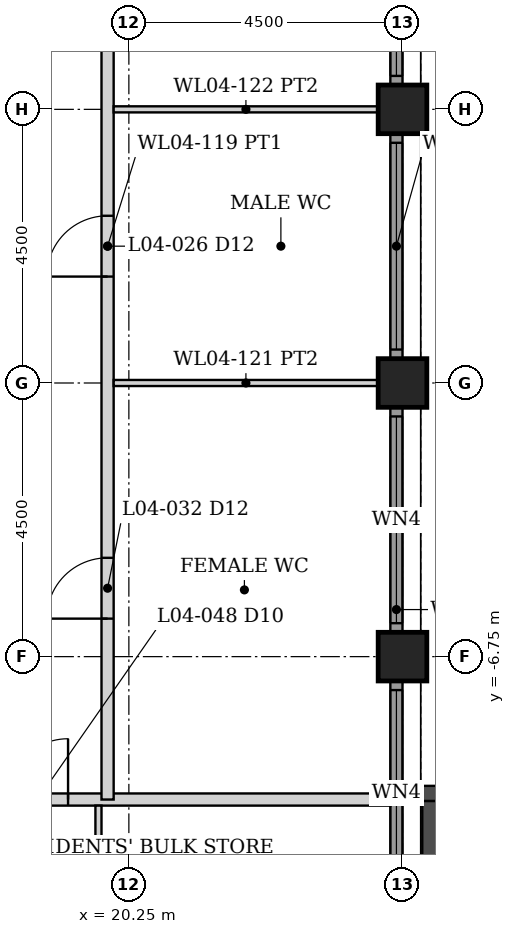
"""IFC4 building model, lengths in metres.
Left out: names, types, materials, properties, quantities, classifications, styles, units other than length and angle.
Written with IfcOpenShell. Run it as: python <this file> out.ifc"""

import sys

from ifc_helpers import new_model, si_unit, direction, frame, frame_2d, origin, origin_2d, place, context, subcontext, project, spatial, rectangle, hollow_rectangle, extrude, element, fill, save


model = new_model("IFC4")
c1 = context("Model", 3, precision=1e-05, world=origin(), true_north=direction((0.0, 1.0)))
c2 = subcontext(c1, "Body", "Model", "MODEL_VIEW")
j1 = project(units=[si_unit("LENGTHUNIT", "METRE"), si_unit("PLANEANGLEUNIT", "RADIAN")], contexts=[c1])
p1 = place(None, origin())
s1 = spatial("IfcSite", under=j1, at=p1, CompositionType="ELEMENT")
p2 = place(p1, origin())
s2 = spatial("IfcBuilding", under=s1, at=p2, CompositionType="ELEMENT")
p3 = place(p2, frame((0.0, 0.0, 21.5)))
s3 = spatial("IfcBuildingStorey", under=s2, at=p3, CompositionType="ELEMENT", Elevation=21.5)
for number, where, z_axis, x_axis in (
    (1, (24.75, -6.75, 0.0), (0.0, 0.0, 1.0), (1.0, 0.0, 0.0)),
    (2, (24.75, -2.25, 0.0), (0.0, 0.0, 1.0), (1.0, 0.0, 0.0)),
    (3, (24.75, 2.25, 0.0), (0.0, 0.0, 1.0), (1.0, 0.0, 0.0)),
):
    element("IfcColumn", number, at=place(p3, frame(where, z_axis=z_axis, x_axis=x_axis)), inside=s3, PredefinedType="COLUMN", context=c2, shape_type="SweptSolid", body=[
        extrude(hollow_rectangle(XDim=0.8, YDim=0.8, WallThickness=0.08, at=origin_2d()), origin(), (0.0, 0.0, 1.0), 5.0),
    ])
p4 = place(p3, frame((25.075, -9.0, 0.0), z_axis=(0.0, 0.0, 1.0), x_axis=(1.0, 0.0, 0.0)))
e4 = element("IfcWall", 4, at=p4, inside=s3, PredefinedType="SHEAR", context=c2, shape_type="SweptSolid", body=[
    extrude(rectangle(XDim=3.55, YDim=0.25, at=frame_2d((1.775, 0.0))), origin(), (0.0, 0.0, 1.0), 5.0),
])
p5 = place(p4, frame((0.475, 0.0, 0.0)))
e5 = element("IfcOpeningElement", 5, at=p5, cuts=e4, PredefinedType="OPENING", context=c2, shape_type="SweptSolid", body=[
    extrude(rectangle(XDim=1.2, YDim=2.2, at=frame_2d((0.6, 1.1))), frame((0.0, 0.135, 0.0), z_axis=(0.0, -1.0, 0.0), x_axis=(1.0, 0.0, 0.0)), (0.0, 0.0, 1.0), 0.27),
])
p6 = place(p3, frame((25.2, -16.375, 0.0), z_axis=(0.0, 0.0, 1.0), x_axis=(0.0, 1.0, 0.0)))
e6 = element("IfcWall", 6, at=p6, inside=s3, PredefinedType="SHEAR", context=c2, shape_type="SweptSolid", body=[
    extrude(rectangle(XDim=7.25, YDim=0.25, at=frame_2d((3.625, 0.0))), origin(), (0.0, 0.0, 1.0), 5.0),
])
p7 = place(p3, frame((24.65, -10.845, 0.0), z_axis=(0.0, 0.0, 1.0), x_axis=(0.0, 1.0, 0.0)))
e7 = element("IfcWall", 7, at=p7, inside=s3, PredefinedType="SOLIDWALL", context=c2, shape_type="SweptSolid", body=[
    extrude(rectangle(XDim=3.69, YDim=0.2, at=frame_2d((1.845, 0.0))), origin(), (0.0, 0.0, 1.0), 3.879),
])
p8 = place(p7, frame((0.145, 0.0, 0.3)))
e8 = element("IfcOpeningElement", 8, at=p8, cuts=e7, PredefinedType="OPENING", context=c2, shape_type="SweptSolid", body=[
    extrude(rectangle(XDim=3.4, YDim=3.429, at=frame_2d((1.7, 1.714))), frame((0.0, 0.11, 0.0), z_axis=(0.0, -1.0, 0.0), x_axis=(1.0, 0.0, 0.0)), (0.0, 0.0, 1.0), 0.22),
])
p9 = place(p3, frame((24.65, -6.345, 0.0), z_axis=(0.0, 0.0, 1.0), x_axis=(0.0, 1.0, 0.0)))
e9 = element("IfcWall", 9, at=p9, inside=s3, PredefinedType="SOLIDWALL", context=c2, shape_type="SweptSolid", body=[
    extrude(rectangle(XDim=3.69, YDim=0.2, at=frame_2d((1.845, 0.0))), origin(), (0.0, 0.0, 1.0), 3.879),
])
p10 = place(p9, frame((0.145, 0.0, 0.3)))
e10 = element("IfcOpeningElement", 10, at=p10, cuts=e9, PredefinedType="OPENING", context=c2, shape_type="SweptSolid", body=[
    extrude(rectangle(XDim=3.4, YDim=3.429, at=frame_2d((1.7, 1.714))), frame((0.0, 0.11, 0.0), z_axis=(0.0, -1.0, 0.0), x_axis=(1.0, 0.0, 0.0)), (0.0, 0.0, 1.0), 0.22),
])
p11 = place(p3, frame((24.65, -1.845, 0.0), z_axis=(0.0, 0.0, 1.0), x_axis=(0.0, 1.0, 0.0)))
e11 = element("IfcWall", 11, at=p11, inside=s3, PredefinedType="SOLIDWALL", context=c2, shape_type="SweptSolid", body=[
    extrude(rectangle(XDim=3.69, YDim=0.2, at=frame_2d((1.845, 0.0))), origin(), (0.0, 0.0, 1.0), 3.879),
])
p12 = place(p11, frame((0.145, 0.0, 0.3)))
e12 = element("IfcOpeningElement", 12, at=p12, cuts=e11, PredefinedType="OPENING", context=c2, shape_type="SweptSolid", body=[
    extrude(rectangle(XDim=3.4, YDim=3.429, at=frame_2d((1.7, 1.714))), frame((0.0, 0.11, 0.0), z_axis=(0.0, -1.0, 0.0), x_axis=(1.0, 0.0, 0.0)), (0.0, 0.0, 1.0), 0.22),
])
p13 = place(p3, frame((24.65, 2.655, 0.0), z_axis=(0.0, 0.0, 1.0), x_axis=(0.0, 1.0, 0.0)))
e13 = element("IfcWall", 13, at=p13, inside=s3, PredefinedType="SOLIDWALL", context=c2, shape_type="SweptSolid", body=[
    extrude(rectangle(XDim=3.69, YDim=0.2, at=frame_2d((1.845, 0.0))), origin(), (0.0, 0.0, 1.0), 3.879),
])
p14 = place(p13, frame((0.145, 0.0, 0.3)))
e14 = element("IfcOpeningElement", 14, at=p14, cuts=e13, PredefinedType="OPENING", context=c2, shape_type="SweptSolid", body=[
    extrude(rectangle(XDim=3.4, YDim=3.429, at=frame_2d((1.7, 1.714))), frame((0.0, 0.11, 0.0), z_axis=(0.0, -1.0, 0.0), x_axis=(1.0, 0.0, 0.0)), (0.0, 0.0, 1.0), 0.22),
])
p15 = place(p3, frame((-24.55, -9.1, 0.0), z_axis=(0.0, 0.0, 1.0), x_axis=(1.0, 0.0, 0.0)))
e15 = element("IfcWall", 15, at=p15, inside=s3, PredefinedType="PARTITIONING", context=c2, shape_type="SweptSolid", body=[
    extrude(rectangle(XDim=49.1, YDim=0.2, at=frame_2d((24.55, 0.0))), origin(), (0.0, 0.0, 1.0), 3.873),
])
p16 = place(p15, frame((6.452, 0.0, 0.0)))
e16 = element("IfcOpeningElement", 16, at=p16, cuts=e15, PredefinedType="OPENING", context=c2, shape_type="SweptSolid", body=[
    extrude(rectangle(XDim=0.9, YDim=2.1, at=frame_2d((0.45, 1.05))), frame((0.0, 0.11, 0.0), z_axis=(0.0, -1.0, 0.0), x_axis=(1.0, 0.0, 0.0)), (0.0, 0.0, 1.0), 0.22),
])
p17 = place(p15, frame((12.85, 0.0, 0.0)))
e17 = element("IfcOpeningElement", 17, at=p17, cuts=e15, PredefinedType="OPENING", context=c2, shape_type="SweptSolid", body=[
    extrude(rectangle(XDim=0.9, YDim=2.1, at=frame_2d((0.45, 1.05))), frame((0.0, 0.11, 0.0), z_axis=(0.0, -1.0, 0.0), x_axis=(1.0, 0.0, 0.0)), (0.0, 0.0, 1.0), 0.22),
])
p18 = place(p15, frame((20.934, 0.0, 0.0)))
e18 = element("IfcOpeningElement", 18, at=p18, cuts=e15, PredefinedType="OPENING", context=c2, shape_type="SweptSolid", body=[
    extrude(rectangle(XDim=0.9, YDim=2.1, at=frame_2d((0.45, 1.05))), frame((0.0, 0.11, 0.0), z_axis=(0.0, -1.0, 0.0), x_axis=(1.0, 0.0, 0.0)), (0.0, 0.0, 1.0), 0.22),
])
p19 = place(p15, frame((18.425, 0.0, 0.0)))
e19 = element("IfcOpeningElement", 19, at=p19, cuts=e15, PredefinedType="OPENING", context=c2, shape_type="SweptSolid", body=[
    extrude(rectangle(XDim=1.5, YDim=2.1, at=frame_2d((0.75, 1.05))), frame((0.0, 0.11, 0.0), z_axis=(0.0, -1.0, 0.0), x_axis=(1.0, 0.0, 0.0)), (0.0, 0.0, 1.0), 0.22),
])
p20 = place(p15, frame((30.18, 0.0, 0.0)))
e20 = element("IfcOpeningElement", 20, at=p20, cuts=e15, PredefinedType="OPENING", context=c2, shape_type="SweptSolid", body=[
    extrude(rectangle(XDim=0.9, YDim=2.1, at=frame_2d((0.45, 1.05))), frame((0.0, 0.11, 0.0), z_axis=(0.0, -1.0, 0.0), x_axis=(1.0, 0.0, 0.0)), (0.0, 0.0, 1.0), 0.22),
])
p21 = place(p15, frame((23.3, 0.0, 0.0)))
e21 = element("IfcOpeningElement", 21, at=p21, cuts=e15, PredefinedType="OPENING", context=c2, shape_type="SweptSolid", body=[
    extrude(rectangle(XDim=1.0, YDim=2.1, at=frame_2d((0.5, 1.05))), frame((0.0, 0.11, 0.0), z_axis=(0.0, -1.0, 0.0), x_axis=(1.0, 0.0, 0.0)), (0.0, 0.0, 1.0), 0.22),
])
p22 = place(p15, frame((26.15, 0.0, 0.0)))
e22 = element("IfcOpeningElement", 22, at=p22, cuts=e15, PredefinedType="OPENING", context=c2, shape_type="SweptSolid", body=[
    extrude(rectangle(XDim=0.8, YDim=2.1, at=frame_2d((0.4, 1.05))), frame((0.0, 0.11, 0.0), z_axis=(0.0, -1.0, 0.0), x_axis=(1.0, 0.0, 0.0)), (0.0, 0.0, 1.0), 0.22),
])
p23 = place(p15, frame((28.4, 0.0, 0.0)))
e23 = element("IfcOpeningElement", 23, at=p23, cuts=e15, PredefinedType="OPENING", context=c2, shape_type="SweptSolid", body=[
    extrude(rectangle(XDim=1.0, YDim=2.1, at=frame_2d((0.5, 1.05))), frame((0.0, 0.11, 0.0), z_axis=(0.0, -1.0, 0.0), x_axis=(1.0, 0.0, 0.0)), (0.0, 0.0, 1.0), 0.22),
])
p24 = place(p15, frame((33.05, 0.0, 0.0)))
e24 = element("IfcOpeningElement", 24, at=p24, cuts=e15, PredefinedType="OPENING", context=c2, shape_type="SweptSolid", body=[
    extrude(rectangle(XDim=1.0, YDim=2.1, at=frame_2d((0.5, 1.05))), frame((0.0, 0.11, 0.0), z_axis=(0.0, -1.0, 0.0), x_axis=(1.0, 0.0, 0.0)), (0.0, 0.0, 1.0), 0.22),
])
p25 = place(p15, frame((37.625, 0.0, 0.0)))
e25 = element("IfcOpeningElement", 25, at=p25, cuts=e15, PredefinedType="OPENING", context=c2, shape_type="SweptSolid", body=[
    extrude(rectangle(XDim=0.9, YDim=2.1, at=frame_2d((0.45, 1.05))), frame((0.0, 0.11, 0.0), z_axis=(0.0, -1.0, 0.0), x_axis=(1.0, 0.0, 0.0)), (0.0, 0.0, 1.0), 0.22),
])
p26 = place(p15, frame((40.8, 0.0, 0.0)))
e26 = element("IfcOpeningElement", 26, at=p26, cuts=e15, PredefinedType="OPENING", context=c2, shape_type="SweptSolid", body=[
    extrude(rectangle(XDim=1.0, YDim=2.1, at=frame_2d((0.5, 1.05))), frame((0.0, 0.11, 0.0), z_axis=(0.0, -1.0, 0.0), x_axis=(1.0, 0.0, 0.0)), (0.0, 0.0, 1.0), 0.22),
])
p27 = place(p15, frame((42.8, 0.0, 0.0)))
e27 = element("IfcOpeningElement", 27, at=p27, cuts=e15, PredefinedType="OPENING", context=c2, shape_type="SweptSolid", body=[
    extrude(rectangle(XDim=1.0, YDim=2.1, at=frame_2d((0.5, 1.05))), frame((0.0, 0.11, 0.0), z_axis=(0.0, -1.0, 0.0), x_axis=(1.0, 0.0, 0.0)), (0.0, 0.0, 1.0), 0.22),
])
p28 = place(p3, frame((19.9, -9.1, 0.0), z_axis=(0.0, 0.0, 1.0), x_axis=(0.0, 1.0, 0.0)))
e28 = element("IfcWall", 28, at=p28, inside=s3, PredefinedType="PARTITIONING", context=c2, shape_type="SweptSolid", body=[
    extrude(rectangle(XDim=18.2, YDim=0.2, at=frame_2d((9.1, 0.0))), origin(), (0.0, 0.0, 1.0), 3.873),
])
p29 = place(p28, frame((2.975, 0.0, 0.0)))
e29 = element("IfcOpeningElement", 29, at=p29, cuts=e28, PredefinedType="OPENING", context=c2, shape_type="SweptSolid", body=[
    extrude(rectangle(XDim=1.0, YDim=2.1, at=frame_2d((0.5, 1.05))), frame((0.0, 0.11, 0.0), z_axis=(0.0, -1.0, 0.0), x_axis=(1.0, 0.0, 0.0)), (0.0, 0.0, 1.0), 0.22),
])
p30 = place(p28, frame((8.6, 0.0, 0.0)))
e30 = element("IfcOpeningElement", 30, at=p30, cuts=e28, PredefinedType="OPENING", context=c2, shape_type="SweptSolid", body=[
    extrude(rectangle(XDim=1.0, YDim=2.1, at=frame_2d((0.5, 1.05))), frame((0.0, 0.11, 0.0), z_axis=(0.0, -1.0, 0.0), x_axis=(1.0, 0.0, 0.0)), (0.0, 0.0, 1.0), 0.22),
])
p31 = place(p28, frame((13.1, 0.0, 0.0)))
e31 = element("IfcOpeningElement", 31, at=p31, cuts=e28, PredefinedType="OPENING", context=c2, shape_type="SweptSolid", body=[
    extrude(rectangle(XDim=1.0, YDim=2.1, at=frame_2d((0.5, 1.05))), frame((0.0, 0.11, 0.0), z_axis=(0.0, -1.0, 0.0), x_axis=(1.0, 0.0, 0.0)), (0.0, 0.0, 1.0), 0.22),
])
p32 = place(p28, frame((16.575, 0.0, 0.0)))
e32 = element("IfcOpeningElement", 32, at=p32, cuts=e28, PredefinedType="OPENING", context=c2, shape_type="SweptSolid", body=[
    extrude(rectangle(XDim=0.8, YDim=2.1, at=frame_2d((0.4, 1.05))), frame((0.0, 0.11, 0.0), z_axis=(0.0, -1.0, 0.0), x_axis=(1.0, 0.0, 0.0)), (0.0, 0.0, 1.0), 0.22),
])
p33 = place(p3, frame((19.75, -14.0, 0.0), z_axis=(0.0, 0.0, 1.0), x_axis=(0.0, 1.0, 0.0)))
e33 = element("IfcWall", 33, at=p33, inside=s3, PredefinedType="PARTITIONING", context=c2, shape_type="SweptSolid", body=[
    extrude(rectangle(XDim=4.8, YDim=0.1, at=frame_2d((2.4, 0.0))), origin(), (0.0, 0.0, 1.0), 3.873),
])
for number, where, z_axis, x_axis in (
    (34, (20.0, -2.25, 0.0), (0.0, 0.0, 1.0), (1.0, 0.0, 0.0)),
    (35, (20.0, 2.25, 0.0), (0.0, 0.0, 1.0), (1.0, 0.0, 0.0)),
):
    element("IfcWall", number, at=place(p3, frame(where, z_axis=z_axis, x_axis=x_axis)), inside=s3, PredefinedType="PARTITIONING", context=c2, shape_type="SweptSolid", body=[
        extrude(rectangle(XDim=4.35, YDim=0.1, at=frame_2d((2.175, 0.0))), origin(), (0.0, 0.0, 1.0), 3.873),
    ])
p34 = place(p8, origin())
e36 = element("IfcWindow", 36, at=p34, inside=s3, PartitioningType="SINGLE_PANEL", PredefinedType="WINDOW", context=c2, shape_type="SweptSolid", body=[
    extrude(rectangle(XDim=3.4, YDim=3.429, at=frame_2d((1.7, 1.714))), frame((0.0, 0.03, 0.0), z_axis=(0.0, -1.0, 0.0), x_axis=(1.0, 0.0, 0.0)), (0.0, 0.0, 1.0), 0.06),
])
fill(e8, e36)
p35 = place(p10, origin())
e37 = element("IfcWindow", 37, at=p35, inside=s3, PartitioningType="SINGLE_PANEL", PredefinedType="WINDOW", context=c2, shape_type="SweptSolid", body=[
    extrude(rectangle(XDim=3.4, YDim=3.429, at=frame_2d((1.7, 1.714))), frame((0.0, 0.03, 0.0), z_axis=(0.0, -1.0, 0.0), x_axis=(1.0, 0.0, 0.0)), (0.0, 0.0, 1.0), 0.06),
])
fill(e10, e37)
p36 = place(p12, origin())
e38 = element("IfcWindow", 38, at=p36, inside=s3, PartitioningType="SINGLE_PANEL", PredefinedType="WINDOW", context=c2, shape_type="SweptSolid", body=[
    extrude(rectangle(XDim=3.4, YDim=3.429, at=frame_2d((1.7, 1.714))), frame((0.0, 0.03, 0.0), z_axis=(0.0, -1.0, 0.0), x_axis=(1.0, 0.0, 0.0)), (0.0, 0.0, 1.0), 0.06),
])
fill(e12, e38)
p37 = place(p14, origin())
e39 = element("IfcWindow", 39, at=p37, inside=s3, PartitioningType="SINGLE_PANEL", PredefinedType="WINDOW", context=c2, shape_type="SweptSolid", body=[
    extrude(rectangle(XDim=3.4, YDim=3.429, at=frame_2d((1.7, 1.714))), frame((0.0, 0.03, 0.0), z_axis=(0.0, -1.0, 0.0), x_axis=(1.0, 0.0, 0.0)), (0.0, 0.0, 1.0), 0.06),
])
fill(e14, e39)
p38 = place(p27, origin())
e40 = element("IfcDoor", 40, at=p38, inside=s3, OperationType="SINGLE_SWING_RIGHT", PredefinedType="DOOR", context=c2, shape_type="SweptSolid", body=[
    extrude(rectangle(XDim=1.0, YDim=2.1, at=frame_2d((0.5, 1.05))), frame((0.0, 0.025, 0.0), z_axis=(0.0, -1.0, 0.0), x_axis=(1.0, 0.0, 0.0)), (0.0, 0.0, 1.0), 0.05),
])
fill(e27, e40)
p39 = place(p29, origin())
e41 = element("IfcDoor", 41, at=p39, inside=s3, OperationType="SINGLE_SWING_LEFT", PredefinedType="DOOR", context=c2, shape_type="SweptSolid", body=[
    extrude(rectangle(XDim=1.0, YDim=2.1, at=frame_2d((0.5, 1.05))), frame((0.0, 0.025, 0.0), z_axis=(0.0, -1.0, 0.0), x_axis=(1.0, 0.0, 0.0)), (0.0, 0.0, 1.0), 0.05),
])
fill(e29, e41)
p40 = place(p30, origin())
e42 = element("IfcDoor", 42, at=p40, inside=s3, OperationType="SINGLE_SWING_LEFT", PredefinedType="DOOR", context=c2, shape_type="SweptSolid", body=[
    extrude(rectangle(XDim=1.0, YDim=2.1, at=frame_2d((0.5, 1.05))), frame((0.0, 0.025, 0.0), z_axis=(0.0, -1.0, 0.0), x_axis=(1.0, 0.0, 0.0)), (0.0, 0.0, 1.0), 0.05),
])
fill(e30, e42)
save(model, sys.argv[1])
